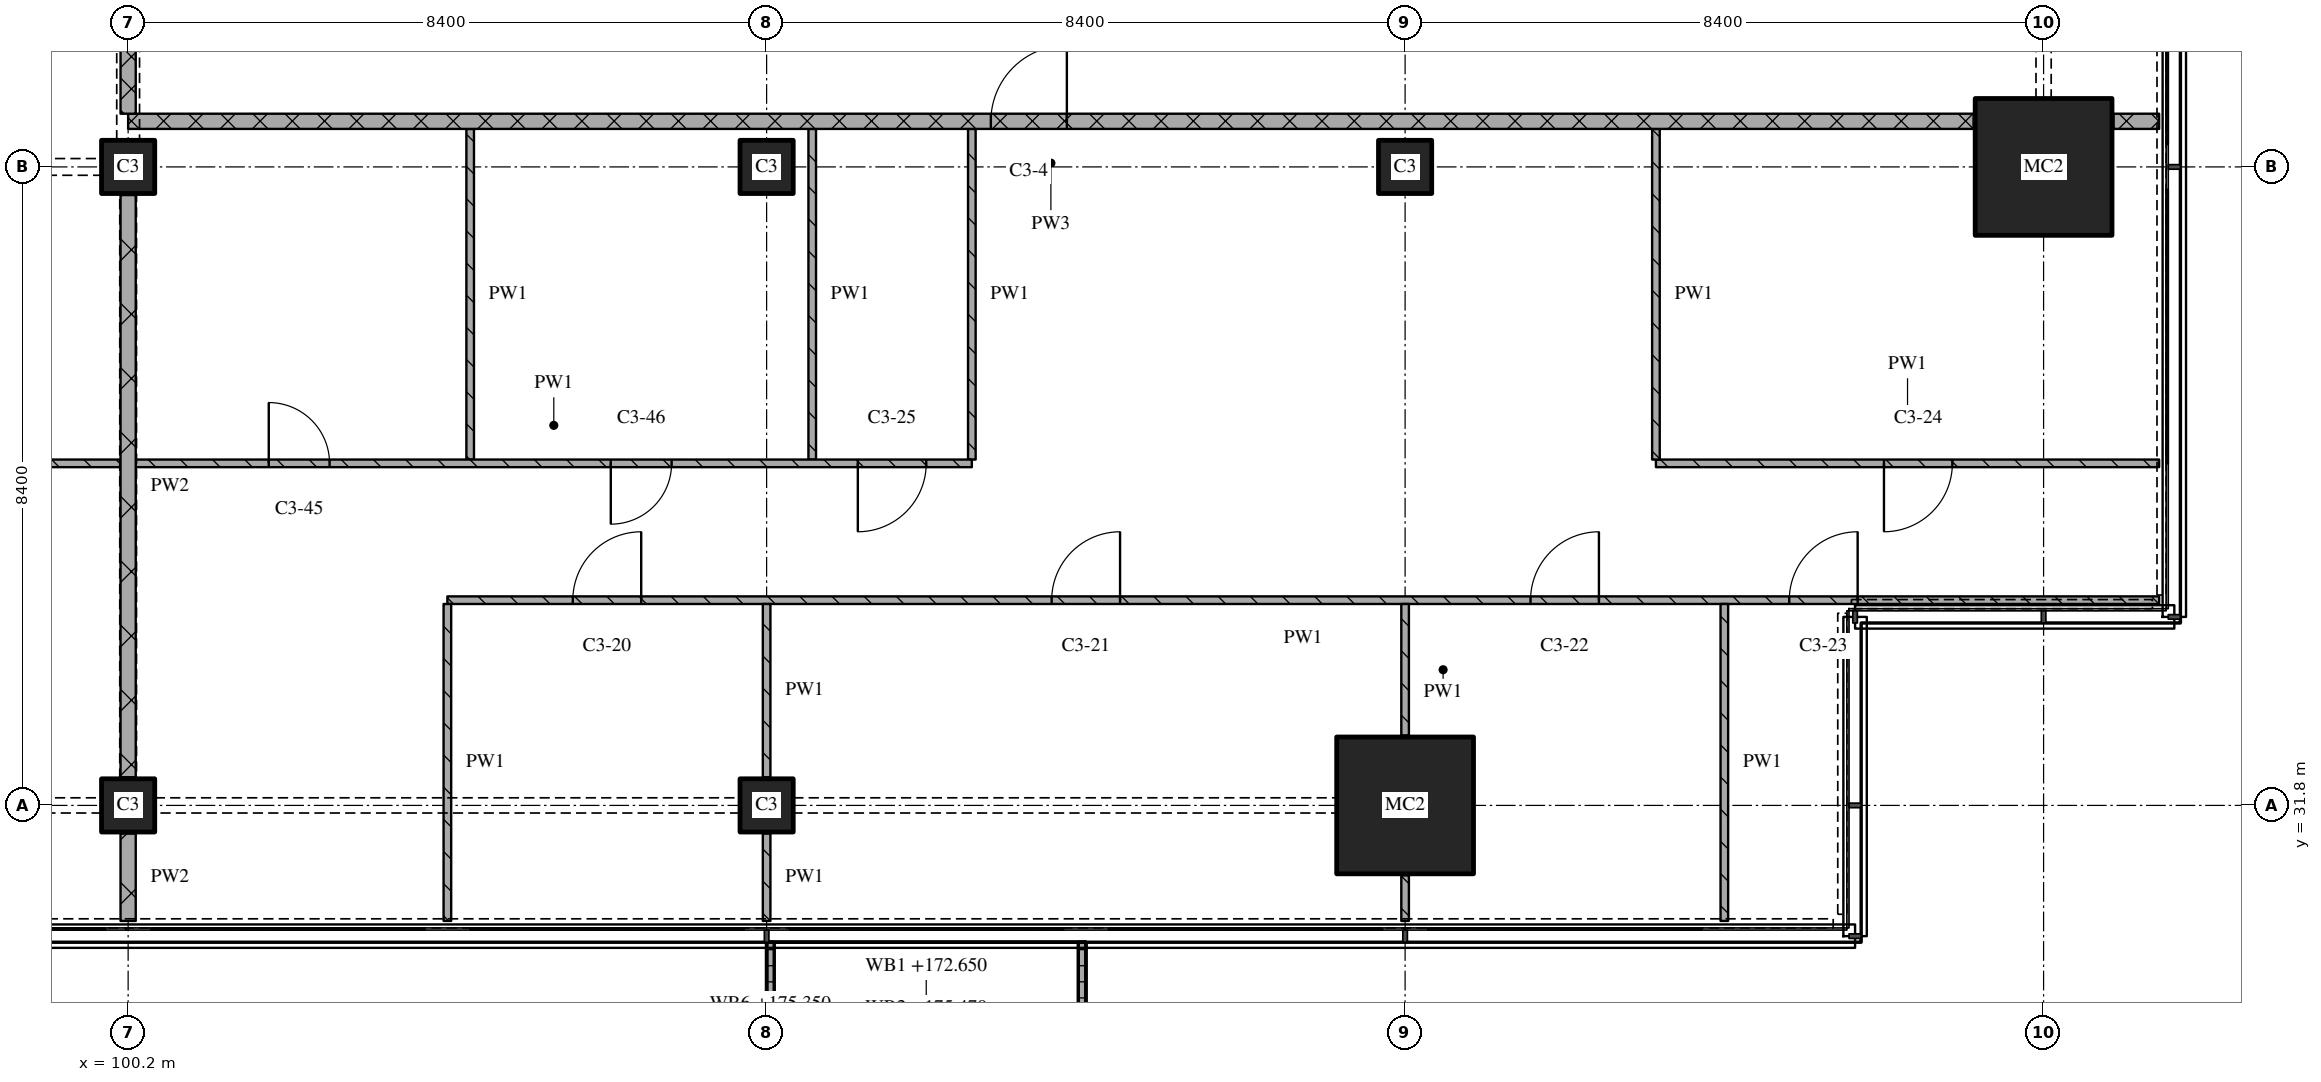
"""IFC4 building model, lengths in metres.
Left out: names, types, materials, properties, quantities, classifications, styles, units other than length and angle.
Written with IfcOpenShell. Run it as: python <this file> out.ifc"""

import sys

from ifc_helpers import new_model, si_unit, direction, frame, frame_2d, origin, origin_2d, place, context, subcontext, project, spatial, polyline, rectangle, outline, extrude, element, fill, save


model = new_model("IFC4")
c1 = context("Model", 3, precision=1e-05, world=origin(), true_north=direction((0.0, 1.0)))
c2 = subcontext(c1, "Body", "Model", "MODEL_VIEW")
j1 = project(units=[si_unit("LENGTHUNIT", "METRE"), si_unit("PLANEANGLEUNIT", "RADIAN")], contexts=[c1])
p1 = place(None, origin())
s1 = spatial("IfcSite", under=j1, at=p1, CompositionType="ELEMENT")
p2 = place(p1, origin())
s2 = spatial("IfcBuilding", under=s1, at=p2, CompositionType="ELEMENT")
p3 = place(p2, frame((0.0, 0.0, 172.65)))
s3 = spatial("IfcBuildingStorey", under=s2, at=p3, CompositionType="ELEMENT", Elevation=172.65)
for number, where, z_axis, x_axis in (
    (1, (100.2, 31.8, 0.0), (0.0, 0.0, 1.0), (1.0, 0.0, 0.0)),
    (2, (100.2, 40.2, 0.0), (0.0, 0.0, 1.0), (1.0, 0.0, 0.0)),
    (3, (108.6, 31.8, 0.0), (0.0, 0.0, 1.0), (1.0, 0.0, 0.0)),
    (4, (108.6, 40.2, 0.0), (0.0, 0.0, 1.0), (1.0, 0.0, 0.0)),
):
    element("IfcColumn", number, at=place(p3, frame(where, z_axis=z_axis, x_axis=x_axis)), inside=s3, PredefinedType="COLUMN", context=c2, shape_type="SweptSolid", body=[
        extrude(rectangle(XDim=0.7, YDim=0.7, at=origin_2d()), origin(), (0.0, 0.0, 1.0), 3.6),
    ])
p4 = place(p3, frame((117.0, 31.8, 0.0), z_axis=(0.0, 0.0, 1.0), x_axis=(1.0, 0.0, 0.0)))
e5 = element("IfcColumn", 5, at=p4, inside=s3, PredefinedType="COLUMN", context=c2, shape_type="SweptSolid", body=[
    extrude(rectangle(XDim=1.8, YDim=1.8, at=origin_2d()), origin(), (0.0, 0.0, 1.0), 3.6),
])
p5 = place(p3, frame((117.0, 40.2, 0.0), z_axis=(0.0, 0.0, 1.0), x_axis=(1.0, 0.0, 0.0)))
e6 = element("IfcColumn", 6, at=p5, inside=s3, PredefinedType="COLUMN", context=c2, shape_type="SweptSolid", body=[
    extrude(rectangle(XDim=0.7, YDim=0.7, at=origin_2d()), origin(), (0.0, 0.0, 1.0), 3.6),
])
p6 = place(p3, frame((125.4, 40.2, 0.0), z_axis=(0.0, 0.0, 1.0), x_axis=(1.0, 0.0, 0.0)))
e7 = element("IfcColumn", 7, at=p6, inside=s3, PredefinedType="COLUMN", context=c2, shape_type="SweptSolid", body=[
    extrude(rectangle(XDim=1.8, YDim=1.8, at=origin_2d()), origin(), (0.0, 0.0, 1.0), 3.6),
])
p7 = place(p3, origin())
e8 = element("IfcWall", 8, at=p7, inside=s3, PredefinedType="SOLIDWALL", context=c2, shape_type="SweptSolid", body=[
    extrude(outline(polyline([(108.6, 30.0), (108.7, 30.0), (108.7, 28.367), (112.7, 28.367), (112.7, 30.0), (112.8, 30.0), (112.8, 28.267), (108.6, 28.267), (108.6, 30.0)])), origin(), (0.0, 0.0, 1.0), 1.0),
])
p8 = place(p3, frame((126.92, 34.5, 0.0), z_axis=(0.0, 0.0, 1.0), x_axis=(-1.0, 0.0, 0.0)))
e9 = element("IfcWall", 9, at=p8, inside=s3, PredefinedType="PARTITIONING", context=c2, shape_type="SweptSolid", body=[
    extrude(rectangle(XDim=22.52, YDim=0.1, at=frame_2d((11.26, 0.0))), origin(), (0.0, 0.0, 1.0), 3.32),
])
p9 = place(p8, frame((3.966, 0.0, 0.0)))
e10 = element("IfcOpeningElement", 10, at=p9, cuts=e9, PredefinedType="OPENING", context=c2, shape_type="SweptSolid", body=[
    extrude(rectangle(XDim=0.9, YDim=2.1, at=frame_2d((0.45, 1.05))), frame((0.0, 0.06, 0.0), z_axis=(0.0, -1.0, 0.0), x_axis=(1.0, 0.0, 0.0)), (0.0, 0.0, 1.0), 0.12),
])
p10 = place(p8, frame((7.37, 0.0, 0.0)))
e11 = element("IfcOpeningElement", 11, at=p10, cuts=e9, PredefinedType="OPENING", context=c2, shape_type="SweptSolid", body=[
    extrude(rectangle(XDim=0.9, YDim=2.1, at=frame_2d((0.45, 1.05))), frame((0.0, 0.06, 0.0), z_axis=(0.0, -1.0, 0.0), x_axis=(1.0, 0.0, 0.0)), (0.0, 0.0, 1.0), 0.12),
])
p11 = place(p8, frame((13.67, 0.0, 0.0)))
e12 = element("IfcOpeningElement", 12, at=p11, cuts=e9, PredefinedType="OPENING", context=c2, shape_type="SweptSolid", body=[
    extrude(rectangle(XDim=0.9, YDim=2.1, at=frame_2d((0.45, 1.05))), frame((0.0, 0.06, 0.0), z_axis=(0.0, -1.0, 0.0), x_axis=(1.0, 0.0, 0.0)), (0.0, 0.0, 1.0), 0.12),
])
p12 = place(p8, frame((19.97, 0.0, 0.0)))
e13 = element("IfcOpeningElement", 13, at=p12, cuts=e9, PredefinedType="OPENING", context=c2, shape_type="SweptSolid", body=[
    extrude(rectangle(XDim=0.9, YDim=2.1, at=frame_2d((0.45, 1.05))), frame((0.0, 0.06, 0.0), z_axis=(0.0, -1.0, 0.0), x_axis=(1.0, 0.0, 0.0)), (0.0, 0.0, 1.0), 0.12),
])
p13 = place(p3, frame((120.3, 36.3, 0.0), z_axis=(0.0, 0.0, 1.0), x_axis=(1.0, 0.0, 0.0)))
e14 = element("IfcWall", 14, at=p13, inside=s3, PredefinedType="PARTITIONING", context=c2, shape_type="SweptSolid", body=[
    extrude(rectangle(XDim=6.62, YDim=0.1, at=frame_2d((3.31, 0.0))), origin(), (0.0, 0.0, 1.0), 3.32),
])
p14 = place(p13, frame((3.0, 0.0, 0.0)))
e15 = element("IfcOpeningElement", 15, at=p14, cuts=e14, PredefinedType="OPENING", context=c2, shape_type="SweptSolid", body=[
    extrude(rectangle(XDim=0.9, YDim=2.1, at=frame_2d((0.45, 1.05))), frame((0.0, 0.06, 0.0), z_axis=(0.0, -1.0, 0.0), x_axis=(1.0, 0.0, 0.0)), (0.0, 0.0, 1.0), 0.12),
])
p15 = place(p3, frame((124.48, 40.8, 0.0), z_axis=(0.0, 0.0, 1.0), x_axis=(-1.0, 0.0, 0.0)))
e16 = element("IfcWall", 16, at=p15, inside=s3, PredefinedType="PARTITIONING", context=c2, shape_type="SweptSolid", body=[
    extrude(rectangle(XDim=24.28, YDim=0.2, at=frame_2d((12.14, 0.0))), origin(), (0.0, 0.0, 1.0), 3.32),
])
p16 = place(p15, frame((11.93, 0.0, 0.0)))
e17 = element("IfcOpeningElement", 17, at=p16, cuts=e16, PredefinedType="OPENING", context=c2, shape_type="SweptSolid", body=[
    extrude(rectangle(XDim=1.0, YDim=2.1, at=frame_2d((0.5, 1.05))), frame((0.0, 0.11, 0.0), z_axis=(0.0, -1.0, 0.0), x_axis=(1.0, 0.0, 0.0)), (0.0, 0.0, 1.0), 0.22),
])
p17 = place(p3, frame((126.32, 40.8, 0.0), z_axis=(0.0, 0.0, 1.0), x_axis=(1.0, 0.0, 0.0)))
e18 = element("IfcWall", 18, at=p17, inside=s3, PredefinedType="PARTITIONING", context=c2, shape_type="SweptSolid", body=[
    extrude(rectangle(XDim=0.6, YDim=0.2, at=frame_2d((0.3, 0.0))), origin(), (0.0, 0.0, 1.0), 3.32),
])
p18 = place(p3, frame((100.2, 43.1, 0.0), z_axis=(0.0, 0.0, 1.0), x_axis=(0.0, -1.0, 0.0)))
e19 = element("IfcWall", 19, at=p18, inside=s3, PredefinedType="PARTITIONING", context=c2, shape_type="SweptSolid", body=[
    extrude(rectangle(XDim=2.2, YDim=0.2, at=frame_2d((1.1, 0.0))), origin(), (0.0, 0.0, 1.0), 2.43),
])
p19 = place(p3, frame((100.2, 31.43, 0.0), z_axis=(0.0, 0.0, 1.0), x_axis=(0.0, -1.0, 0.0)))
e20 = element("IfcWall", 20, at=p19, inside=s3, PredefinedType="PARTITIONING", context=c2, shape_type="SweptSolid", body=[
    extrude(rectangle(XDim=1.15, YDim=0.2, at=frame_2d((0.575, 0.0))), origin(), (0.0, 0.0, 1.0), 3.32),
])
p20 = place(p3, frame((100.2, 39.83, 0.0), z_axis=(0.0, 0.0, 1.0), x_axis=(0.0, -1.0, 0.0)))
e21 = element("IfcWall", 21, at=p20, inside=s3, PredefinedType="PARTITIONING", context=c2, shape_type="SweptSolid", body=[
    extrude(rectangle(XDim=7.66, YDim=0.2, at=frame_2d((3.83, 0.0))), origin(), (0.0, 0.0, 1.0), 2.72),
])
p21 = place(p3, frame((104.4, 34.45, 0.0), z_axis=(0.0, 0.0, 1.0), x_axis=(0.0, -1.0, 0.0)))
e22 = element("IfcWall", 22, at=p21, inside=s3, PredefinedType="PARTITIONING", context=c2, shape_type="SweptSolid", body=[
    extrude(rectangle(XDim=4.17, YDim=0.1, at=frame_2d((2.085, 0.0))), origin(), (0.0, 0.0, 1.0), 3.32),
])
p22 = place(p3, frame((104.7, 40.7, 0.0), z_axis=(0.0, 0.0, 1.0), x_axis=(0.0, -1.0, 0.0)))
e23 = element("IfcWall", 23, at=p22, inside=s3, PredefinedType="PARTITIONING", context=c2, shape_type="SweptSolid", body=[
    extrude(rectangle(XDim=4.35, YDim=0.1, at=frame_2d((2.175, 0.0))), origin(), (0.0, 0.0, 1.0), 3.32),
])
p23 = place(p3, frame((108.6, 31.43, 0.0), z_axis=(0.0, 0.0, 1.0), x_axis=(0.0, -1.0, 0.0)))
e24 = element("IfcWall", 24, at=p23, inside=s3, PredefinedType="PARTITIONING", context=c2, shape_type="SweptSolid", body=[
    extrude(rectangle(XDim=1.15, YDim=0.1, at=frame_2d((0.575, 0.0))), origin(), (0.0, 0.0, 1.0), 3.32),
])
p24 = place(p3, frame((108.6, 34.45, 0.0), z_axis=(0.0, 0.0, 1.0), x_axis=(0.0, -1.0, 0.0)))
e25 = element("IfcWall", 25, at=p24, inside=s3, PredefinedType="PARTITIONING", context=c2, shape_type="SweptSolid", body=[
    extrude(rectangle(XDim=2.28, YDim=0.1, at=frame_2d((1.14, 0.0))), origin(), (0.0, 0.0, 1.0), 3.32),
])
for number, where, z_axis, x_axis in (
    (26, (109.2, 40.7, 0.0), (0.0, 0.0, 1.0), (0.0, -1.0, 0.0)),
    (27, (111.3, 40.7, 0.0), (0.0, 0.0, 1.0), (0.0, -1.0, 0.0)),
):
    element("IfcWall", number, at=place(p3, frame(where, z_axis=z_axis, x_axis=x_axis)), inside=s3, PredefinedType="PARTITIONING", context=c2, shape_type="SweptSolid", body=[
        extrude(rectangle(XDim=4.35, YDim=0.1, at=frame_2d((2.175, 0.0))), origin(), (0.0, 0.0, 1.0), 3.32),
    ])
p25 = place(p3, frame((117.0, 30.88, 0.0), z_axis=(0.0, 0.0, 1.0), x_axis=(0.0, -1.0, 0.0)))
e28 = element("IfcWall", 28, at=p25, inside=s3, PredefinedType="PARTITIONING", context=c2, shape_type="SweptSolid", body=[
    extrude(rectangle(XDim=0.6, YDim=0.1, at=frame_2d((0.3, 0.0))), origin(), (0.0, 0.0, 1.0), 3.32),
])
p26 = place(p3, frame((117.0, 34.45, 0.0), z_axis=(0.0, 0.0, 1.0), x_axis=(0.0, -1.0, 0.0)))
e29 = element("IfcWall", 29, at=p26, inside=s3, PredefinedType="PARTITIONING", context=c2, shape_type="SweptSolid", body=[
    extrude(rectangle(XDim=1.73, YDim=0.1, at=frame_2d((0.865, 0.0))), origin(), (0.0, 0.0, 1.0), 3.32),
])
p27 = place(p3, frame((120.3, 40.7, 0.0), z_axis=(0.0, 0.0, 1.0), x_axis=(0.0, -1.0, 0.0)))
e30 = element("IfcWall", 30, at=p27, inside=s3, PredefinedType="PARTITIONING", context=c2, shape_type="SweptSolid", body=[
    extrude(rectangle(XDim=4.35, YDim=0.1, at=frame_2d((2.175, 0.0))), origin(), (0.0, 0.0, 1.0), 3.32),
])
p28 = place(p3, frame((121.2, 34.45, 0.0), z_axis=(0.0, 0.0, 1.0), x_axis=(0.0, -1.0, 0.0)))
e31 = element("IfcWall", 31, at=p28, inside=s3, PredefinedType="PARTITIONING", context=c2, shape_type="SweptSolid", body=[
    extrude(rectangle(XDim=4.17, YDim=0.1, at=frame_2d((2.085, 0.0))), origin(), (0.0, 0.0, 1.0), 3.32),
])
p29 = place(p3, frame((100.1, 36.3, 0.0), z_axis=(0.0, 0.0, 1.0), x_axis=(-1.0, 0.0, 0.0)))
e32 = element("IfcWall", 32, at=p29, inside=s3, PredefinedType="PARTITIONING", context=c2, shape_type="SweptSolid", body=[
    extrude(rectangle(XDim=4.1, YDim=0.1, at=frame_2d((2.05, 0.0))), origin(), (0.0, 0.0, 1.0), 3.32),
])
p30 = place(p29, frame((1.55, 0.0, 0.0)))
e33 = element("IfcOpeningElement", 33, at=p30, cuts=e32, PredefinedType="OPENING", context=c2, shape_type="SweptSolid", body=[
    extrude(rectangle(XDim=0.9, YDim=2.1, at=frame_2d((0.45, 1.05))), frame((0.0, 0.06, 0.0), z_axis=(0.0, -1.0, 0.0), x_axis=(1.0, 0.0, 0.0)), (0.0, 0.0, 1.0), 0.12),
])
p31 = place(p3, frame((100.3, 36.3, 0.0), z_axis=(0.0, 0.0, 1.0), x_axis=(1.0, 0.0, 0.0)))
e34 = element("IfcWall", 34, at=p31, inside=s3, PredefinedType="PARTITIONING", context=c2, shape_type="SweptSolid", body=[
    extrude(rectangle(XDim=11.0, YDim=0.1, at=frame_2d((5.5, 0.0))), origin(), (0.0, 0.0, 1.0), 3.32),
])
p32 = place(p31, frame((1.75, 0.0, 0.0)))
e35 = element("IfcOpeningElement", 35, at=p32, cuts=e34, PredefinedType="OPENING", context=c2, shape_type="SweptSolid", body=[
    extrude(rectangle(XDim=0.8, YDim=2.1, at=frame_2d((0.4, 1.05))), frame((0.0, 0.06, 0.0), z_axis=(0.0, -1.0, 0.0), x_axis=(1.0, 0.0, 0.0)), (0.0, 0.0, 1.0), 0.12),
])
p33 = place(p31, frame((6.25, 0.0, 0.0)))
e36 = element("IfcOpeningElement", 36, at=p33, cuts=e34, PredefinedType="OPENING", context=c2, shape_type="SweptSolid", body=[
    extrude(rectangle(XDim=0.8, YDim=2.1, at=frame_2d((0.4, 1.05))), frame((0.0, 0.06, 0.0), z_axis=(0.0, -1.0, 0.0), x_axis=(1.0, 0.0, 0.0)), (0.0, 0.0, 1.0), 0.12),
])
p34 = place(p31, frame((9.5, 0.0, 0.0)))
e37 = element("IfcOpeningElement", 37, at=p34, cuts=e34, PredefinedType="OPENING", context=c2, shape_type="SweptSolid", body=[
    extrude(rectangle(XDim=0.9, YDim=2.1, at=frame_2d((0.45, 1.05))), frame((0.0, 0.06, 0.0), z_axis=(0.0, -1.0, 0.0), x_axis=(1.0, 0.0, 0.0)), (0.0, 0.0, 1.0), 0.12),
])
p35 = place(p9, origin())
e38 = element("IfcDoor", 38, at=p35, inside=s3, OperationType="SINGLE_SWING_RIGHT", PredefinedType="DOOR", context=c2, shape_type="SweptSolid", body=[
    extrude(rectangle(XDim=0.9, YDim=2.1, at=frame_2d((0.45, 1.05))), frame((0.0, 0.025, 0.0), z_axis=(0.0, -1.0, 0.0), x_axis=(1.0, 0.0, 0.0)), (0.0, 0.0, 1.0), 0.05),
])
fill(e10, e38)
p36 = place(p10, origin())
e39 = element("IfcDoor", 39, at=p36, inside=s3, OperationType="SINGLE_SWING_RIGHT", PredefinedType="DOOR", context=c2, shape_type="SweptSolid", body=[
    extrude(rectangle(XDim=0.9, YDim=2.1, at=frame_2d((0.45, 1.05))), frame((0.0, 0.025, 0.0), z_axis=(0.0, -1.0, 0.0), x_axis=(1.0, 0.0, 0.0)), (0.0, 0.0, 1.0), 0.05),
])
fill(e11, e39)
p37 = place(p11, origin())
e40 = element("IfcDoor", 40, at=p37, inside=s3, OperationType="SINGLE_SWING_RIGHT", PredefinedType="DOOR", context=c2, shape_type="SweptSolid", body=[
    extrude(rectangle(XDim=0.9, YDim=2.1, at=frame_2d((0.45, 1.05))), frame((0.0, 0.025, 0.0), z_axis=(0.0, -1.0, 0.0), x_axis=(1.0, 0.0, 0.0)), (0.0, 0.0, 1.0), 0.05),
])
fill(e12, e40)
p38 = place(p12, origin())
e41 = element("IfcDoor", 41, at=p38, inside=s3, OperationType="SINGLE_SWING_RIGHT", PredefinedType="DOOR", context=c2, shape_type="SweptSolid", body=[
    extrude(rectangle(XDim=0.9, YDim=2.1, at=frame_2d((0.45, 1.05))), frame((0.0, 0.025, 0.0), z_axis=(0.0, -1.0, 0.0), x_axis=(1.0, 0.0, 0.0)), (0.0, 0.0, 1.0), 0.05),
])
fill(e13, e41)
p39 = place(p14, origin())
e42 = element("IfcDoor", 42, at=p39, inside=s3, OperationType="SINGLE_SWING_RIGHT", PredefinedType="DOOR", context=c2, shape_type="SweptSolid", body=[
    extrude(rectangle(XDim=0.9, YDim=2.1, at=frame_2d((0.45, 1.05))), frame((0.0, 0.025, 0.0), z_axis=(0.0, -1.0, 0.0), x_axis=(1.0, 0.0, 0.0)), (0.0, 0.0, 1.0), 0.05),
])
fill(e15, e42)
p40 = place(p16, origin())
e43 = element("IfcDoor", 43, at=p40, inside=s3, OperationType="SINGLE_SWING_RIGHT", PredefinedType="DOOR", context=c2, shape_type="SweptSolid", body=[
    extrude(rectangle(XDim=1.0, YDim=2.1, at=frame_2d((0.5, 1.05))), frame((0.0, 0.025, 0.0), z_axis=(0.0, -1.0, 0.0), x_axis=(1.0, 0.0, 0.0)), (0.0, 0.0, 1.0), 0.05),
])
fill(e17, e43)
p41 = place(p32, origin())
e44 = element("IfcDoor", 44, at=p41, inside=s3, OperationType="SINGLE_SWING_LEFT", PredefinedType="DOOR", context=c2, shape_type="SweptSolid", body=[
    extrude(rectangle(XDim=0.8, YDim=2.1, at=frame_2d((0.4, 1.05))), frame((0.0, 0.025, 0.0), z_axis=(0.0, -1.0, 0.0), x_axis=(1.0, 0.0, 0.0)), (0.0, 0.0, 1.0), 0.05),
])
fill(e35, e44)
p42 = place(p33, origin())
e45 = element("IfcDoor", 45, at=p42, inside=s3, OperationType="SINGLE_SWING_RIGHT", PredefinedType="DOOR", context=c2, shape_type="SweptSolid", body=[
    extrude(rectangle(XDim=0.8, YDim=2.1, at=frame_2d((0.4, 1.05))), frame((0.0, 0.025, 0.0), z_axis=(0.0, -1.0, 0.0), x_axis=(1.0, 0.0, 0.0)), (0.0, 0.0, 1.0), 0.05),
])
fill(e36, e45)
p43 = place(p34, origin())
e46 = element("IfcDoor", 46, at=p43, inside=s3, OperationType="SINGLE_SWING_RIGHT", PredefinedType="DOOR", context=c2, shape_type="SweptSolid", body=[
    extrude(rectangle(XDim=0.9, YDim=2.1, at=frame_2d((0.45, 1.05))), frame((0.0, 0.025, 0.0), z_axis=(0.0, -1.0, 0.0), x_axis=(1.0, 0.0, 0.0)), (0.0, 0.0, 1.0), 0.05),
])
fill(e37, e46)
save(model, sys.argv[1])
